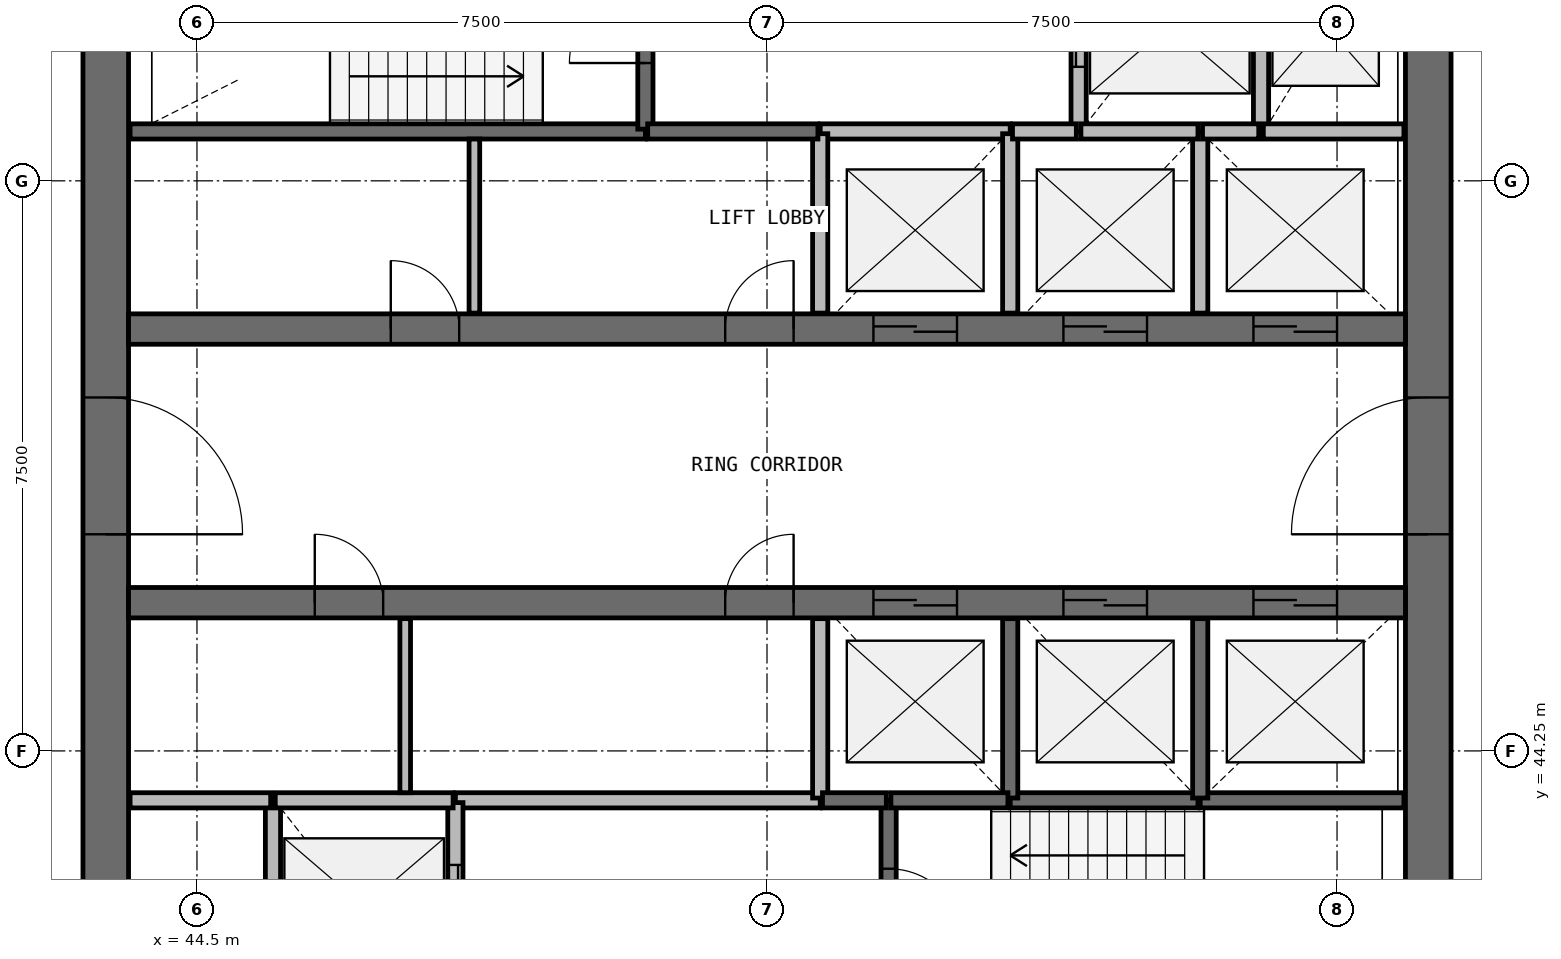
"""IFC4 building model, lengths in metres.
Left out: names, types, materials, properties, quantities, classifications, styles, units other than length and angle.
Written with IfcOpenShell. Run it as: python <this file> out.ifc"""

import sys

from ifc_helpers import new_model, si_unit, direction, frame, frame_2d, origin, place, context, subcontext, project, spatial, rectangle, extrude, source, transform, mapped, element, fill, save


model = new_model("IFC4")
c1 = context("Model", 3, precision=1e-05, world=origin(), true_north=direction((0.0, 1.0)))
c2 = subcontext(c1, "Body", "Model", "MODEL_VIEW")
j1 = project(units=[si_unit("LENGTHUNIT", "METRE"), si_unit("PLANEANGLEUNIT", "RADIAN")], contexts=[c1])
p1 = place(None, origin())
s1 = spatial("IfcSite", under=j1, at=p1, CompositionType="ELEMENT")
p2 = place(p1, origin())
s2 = spatial("IfcBuilding", under=s1, at=p2, CompositionType="ELEMENT")
p3 = place(p2, frame((0.0, 0.0, 211.1)))
s3 = spatial("IfcBuildingStorey", under=s2, at=p3, CompositionType="ELEMENT", Elevation=211.1)
p4 = place(p3, frame((60.7, 40.0, 0.0), z_axis=(0.0, 0.0, 1.0), x_axis=(0.0, 1.0, 0.0)))
e1 = element("IfcWall", 1, at=p4, inside=s3, PredefinedType="SHEAR", context=c2, shape_type="SweptSolid", body=[
    extrude(rectangle(XDim=16.0, YDim=0.6, at=frame_2d((8.0, 0.0))), origin(), (0.0, 0.0, 1.0), 3.9),
])
p5 = place(p4, frame((7.1, 0.0, 0.0)))
e2 = element("IfcOpeningElement", 2, at=p5, cuts=e1, PredefinedType="OPENING", context=c2, shape_type="SweptSolid", body=[
    extrude(rectangle(XDim=1.8, YDim=2.1, at=frame_2d((0.9, 1.05))), frame((0.0, 0.31, 0.0), z_axis=(0.0, -1.0, 0.0), x_axis=(1.0, 0.0, 0.0)), (0.0, 0.0, 1.0), 0.62),
])
p6 = place(p3, frame((43.3, 56.0, 0.0), z_axis=(0.0, 0.0, 1.0), x_axis=(0.0, -1.0, 0.0)))
e3 = element("IfcWall", 3, at=p6, inside=s3, PredefinedType="SHEAR", context=c2, shape_type="SweptSolid", body=[
    extrude(rectangle(XDim=16.0, YDim=0.6, at=frame_2d((8.0, 0.0))), origin(), (0.0, 0.0, 1.0), 3.9),
])
p7 = place(p6, frame((7.1, 0.0, 0.0)))
e4 = element("IfcOpeningElement", 4, at=p7, cuts=e3, PredefinedType="OPENING", context=c2, shape_type="SweptSolid", body=[
    extrude(rectangle(XDim=1.8, YDim=2.1, at=frame_2d((0.9, 1.05))), frame((0.0, 0.31, 0.0), z_axis=(0.0, -1.0, 0.0), x_axis=(1.0, 0.0, 0.0)), (0.0, 0.0, 1.0), 0.62),
])
p8 = place(p3, frame((43.6, 49.8, 0.0), z_axis=(0.0, 0.0, 1.0), x_axis=(1.0, 0.0, 0.0)))
e5 = element("IfcWall", 5, at=p8, inside=s3, PredefinedType="SHEAR", context=c2, shape_type="SweptSolid", body=[
    extrude(rectangle(XDim=16.8, YDim=0.4, at=frame_2d((8.4, 0.0))), origin(), (0.0, 0.0, 1.0), 3.9),
])
p9 = place(p8, frame((9.8, 0.0, 0.0)))
e6 = element("IfcOpeningElement", 6, at=p9, cuts=e5, PredefinedType="OPENING", context=c2, shape_type="SweptSolid", body=[
    extrude(rectangle(XDim=1.1, YDim=2.1, at=frame_2d((0.55, 1.05))), frame((0.0, 0.21, 0.0), z_axis=(0.0, -1.0, 0.0), x_axis=(1.0, 0.0, 0.0)), (0.0, 0.0, 1.0), 0.42),
])
p10 = place(p8, frame((12.3, 0.0, 0.0)))
e7 = element("IfcOpeningElement", 7, at=p10, cuts=e5, PredefinedType="OPENING", context=c2, shape_type="SweptSolid", body=[
    extrude(rectangle(XDim=1.1, YDim=2.1, at=frame_2d((0.55, 1.05))), frame((0.0, 0.21, 0.0), z_axis=(0.0, -1.0, 0.0), x_axis=(1.0, 0.0, 0.0)), (0.0, 0.0, 1.0), 0.42),
])
p11 = place(p8, frame((14.8, 0.0, 0.0)))
e8 = element("IfcOpeningElement", 8, at=p11, cuts=e5, PredefinedType="OPENING", context=c2, shape_type="SweptSolid", body=[
    extrude(rectangle(XDim=1.1, YDim=2.1, at=frame_2d((0.55, 1.05))), frame((0.0, 0.21, 0.0), z_axis=(0.0, -1.0, 0.0), x_axis=(1.0, 0.0, 0.0)), (0.0, 0.0, 1.0), 0.42),
])
p12 = place(p8, frame((3.45, 0.0, 0.0)))
e9 = element("IfcOpeningElement", 9, at=p12, cuts=e5, PredefinedType="OPENING", context=c2, shape_type="SweptSolid", body=[
    extrude(rectangle(XDim=0.9, YDim=2.1, at=frame_2d((0.45, 1.05))), frame((0.0, 0.21, 0.0), z_axis=(0.0, -1.0, 0.0), x_axis=(1.0, 0.0, 0.0)), (0.0, 0.0, 1.0), 0.42),
])
p13 = place(p8, frame((7.85, 0.0, 0.0)))
e10 = element("IfcOpeningElement", 10, at=p13, cuts=e5, PredefinedType="OPENING", context=c2, shape_type="SweptSolid", body=[
    extrude(rectangle(XDim=0.9, YDim=2.1, at=frame_2d((0.45, 1.05))), frame((0.0, 0.21, 0.0), z_axis=(0.0, -1.0, 0.0), x_axis=(1.0, 0.0, 0.0)), (0.0, 0.0, 1.0), 0.42),
])
p14 = place(p3, frame((43.6, 46.2, 0.0), z_axis=(0.0, 0.0, 1.0), x_axis=(1.0, 0.0, 0.0)))
e11 = element("IfcWall", 11, at=p14, inside=s3, PredefinedType="SHEAR", context=c2, shape_type="SweptSolid", body=[
    extrude(rectangle(XDim=16.8, YDim=0.4, at=frame_2d((8.4, 0.0))), origin(), (0.0, 0.0, 1.0), 3.9),
])
p15 = place(p14, frame((9.8, 0.0, 0.0)))
e12 = element("IfcOpeningElement", 12, at=p15, cuts=e11, PredefinedType="OPENING", context=c2, shape_type="SweptSolid", body=[
    extrude(rectangle(XDim=1.1, YDim=2.1, at=frame_2d((0.55, 1.05))), frame((0.0, 0.21, 0.0), z_axis=(0.0, -1.0, 0.0), x_axis=(1.0, 0.0, 0.0)), (0.0, 0.0, 1.0), 0.42),
])
p16 = place(p14, frame((12.3, 0.0, 0.0)))
e13 = element("IfcOpeningElement", 13, at=p16, cuts=e11, PredefinedType="OPENING", context=c2, shape_type="SweptSolid", body=[
    extrude(rectangle(XDim=1.1, YDim=2.1, at=frame_2d((0.55, 1.05))), frame((0.0, 0.21, 0.0), z_axis=(0.0, -1.0, 0.0), x_axis=(1.0, 0.0, 0.0)), (0.0, 0.0, 1.0), 0.42),
])
p17 = place(p14, frame((14.8, 0.0, 0.0)))
e14 = element("IfcOpeningElement", 14, at=p17, cuts=e11, PredefinedType="OPENING", context=c2, shape_type="SweptSolid", body=[
    extrude(rectangle(XDim=1.1, YDim=2.1, at=frame_2d((0.55, 1.05))), frame((0.0, 0.21, 0.0), z_axis=(0.0, -1.0, 0.0), x_axis=(1.0, 0.0, 0.0)), (0.0, 0.0, 1.0), 0.42),
])
p18 = place(p14, frame((2.45, 0.0, 0.0)))
e15 = element("IfcOpeningElement", 15, at=p18, cuts=e11, PredefinedType="OPENING", context=c2, shape_type="SweptSolid", body=[
    extrude(rectangle(XDim=0.9, YDim=2.1, at=frame_2d((0.45, 1.05))), frame((0.0, 0.21, 0.0), z_axis=(0.0, -1.0, 0.0), x_axis=(1.0, 0.0, 0.0)), (0.0, 0.0, 1.0), 0.42),
])
p19 = place(p14, frame((7.85, 0.0, 0.0)))
e16 = element("IfcOpeningElement", 16, at=p19, cuts=e11, PredefinedType="OPENING", context=c2, shape_type="SweptSolid", body=[
    extrude(rectangle(XDim=0.9, YDim=2.1, at=frame_2d((0.45, 1.05))), frame((0.0, 0.21, 0.0), z_axis=(0.0, -1.0, 0.0), x_axis=(1.0, 0.0, 0.0)), (0.0, 0.0, 1.0), 0.42),
])
p20 = place(p3, frame((43.62, 52.4, 0.0), z_axis=(0.0, 0.0, 1.0), x_axis=(1.0, 0.0, 0.0)))
e17 = element("IfcWall", 17, at=p20, inside=s3, PredefinedType="SOLIDWALL", context=c2, shape_type="SweptSolid", body=[
    extrude(rectangle(XDim=6.78, YDim=0.2, at=frame_2d((3.39, 0.0))), origin(), (0.0, 0.0, 1.0), 3.58),
])
p21 = place(p3, frame((52.7, 43.6, 0.0), z_axis=(0.0, 0.0, 1.0), x_axis=(-1.0, 0.0, 0.0)))
e18 = element("IfcWall", 18, at=p21, inside=s3, PredefinedType="SOLIDWALL", context=c2, shape_type="SweptSolid", body=[
    extrude(rectangle(XDim=4.8, YDim=0.2, at=frame_2d((2.4, 0.0))), origin(), (0.0, 0.0, 1.0), 3.58),
])
p22 = place(p3, frame((45.5, 43.6, 0.0), z_axis=(0.0, 0.0, 1.0), x_axis=(0.0, -1.0, 0.0)))
e19 = element("IfcWall", 19, at=p22, inside=s3, PredefinedType="SOLIDWALL", context=c2, shape_type="SweptSolid", body=[
    extrude(rectangle(XDim=2.98, YDim=0.2, at=frame_2d((1.49, 0.0))), origin(), (0.0, 0.0, 1.0), 3.58),
])
p23 = place(p3, frame((47.9, 40.62, 0.0), z_axis=(0.0, 0.0, 1.0), x_axis=(0.0, 1.0, 0.0)))
e20 = element("IfcWall", 20, at=p23, inside=s3, PredefinedType="SOLIDWALL", context=c2, shape_type="SweptSolid", body=[
    extrude(rectangle(XDim=2.95, YDim=0.2, at=frame_2d((1.475, 0.0))), origin(), (0.0, 0.0, 1.0), 3.58),
])
p24 = place(p23, frame((1.03, 0.0, 0.0)))
e21 = element("IfcOpeningElement", 21, at=p24, cuts=e20, PredefinedType="OPENING", context=c2, shape_type="SweptSolid", body=[
    extrude(rectangle(XDim=1.1, YDim=2.1, at=frame_2d((0.55, 1.05))), frame((0.0, 0.11, 0.0), z_axis=(0.0, -1.0, 0.0), x_axis=(1.0, 0.0, 0.0)), (0.0, 0.0, 1.0), 0.22),
])
p25 = place(p3, frame((50.4, 52.43, 0.0), z_axis=(0.0, 0.0, 1.0), x_axis=(0.0, 1.0, 0.0)))
e22 = element("IfcWall", 22, at=p25, inside=s3, PredefinedType="SOLIDWALL", context=c2, shape_type="SweptSolid", body=[
    extrude(rectangle(XDim=2.95, YDim=0.2, at=frame_2d((1.475, 0.0))), origin(), (0.0, 0.0, 1.0), 3.58),
])
p26 = place(p25, frame((0.87, 0.0, 0.0)))
e23 = element("IfcOpeningElement", 23, at=p26, cuts=e22, PredefinedType="OPENING", context=c2, shape_type="SweptSolid", body=[
    extrude(rectangle(XDim=1.0, YDim=2.1, at=frame_2d((0.5, 1.05))), frame((0.0, 0.11, 0.0), z_axis=(0.0, -1.0, 0.0), x_axis=(1.0, 0.0, 0.0)), (0.0, 0.0, 1.0), 0.22),
])
p27 = place(p3, frame((53.6, 43.6, 0.0), z_axis=(0.0, 0.0, 1.0), x_axis=(0.0, -1.0, 0.0)))
e24 = element("IfcWall", 24, at=p27, inside=s3, PredefinedType="SOLIDWALL", context=c2, shape_type="SweptSolid", body=[
    extrude(rectangle(XDim=2.98, YDim=0.2, at=frame_2d((1.49, 0.0))), origin(), (0.0, 0.0, 1.0), 3.58),
])
p28 = place(p27, frame((0.9, 0.0, 0.0)))
e25 = element("IfcOpeningElement", 25, at=p28, cuts=e24, PredefinedType="OPENING", context=c2, shape_type="SweptSolid", body=[
    extrude(rectangle(XDim=1.0, YDim=2.1, at=frame_2d((0.5, 1.05))), frame((0.0, 0.11, 0.0), z_axis=(0.0, -1.0, 0.0), x_axis=(1.0, 0.0, 0.0)), (0.0, 0.0, 1.0), 0.22),
])
p29 = place(p3, frame((56.1, 55.38, 0.0), z_axis=(0.0, 0.0, 1.0), x_axis=(0.0, -1.0, 0.0)))
e26 = element("IfcWall", 26, at=p29, inside=s3, PredefinedType="SOLIDWALL", context=c2, shape_type="SweptSolid", body=[
    extrude(rectangle(XDim=2.98, YDim=0.2, at=frame_2d((1.49, 0.0))), origin(), (0.0, 0.0, 1.0), 3.58),
])
p30 = place(p29, frame((1.03, 0.0, 0.0)))
e27 = element("IfcOpeningElement", 27, at=p30, cuts=e26, PredefinedType="OPENING", context=c2, shape_type="SweptSolid", body=[
    extrude(rectangle(XDim=1.1, YDim=2.1, at=frame_2d((0.55, 1.05))), frame((0.0, 0.11, 0.0), z_axis=(0.0, -1.0, 0.0), x_axis=(1.0, 0.0, 0.0)), (0.0, 0.0, 1.0), 0.22),
])
p31 = place(p3, frame((58.5, 52.4, 0.0), z_axis=(0.0, 0.0, 1.0), x_axis=(0.0, 1.0, 0.0)))
e28 = element("IfcWall", 28, at=p31, inside=s3, PredefinedType="SOLIDWALL", context=c2, shape_type="SweptSolid", body=[
    extrude(rectangle(XDim=2.98, YDim=0.2, at=frame_2d((1.49, 0.0))), origin(), (0.0, 0.0, 1.0), 3.58),
])
p32 = place(p3, frame((57.7, 43.6, 0.0), z_axis=(0.0, 0.0, 1.0), x_axis=(1.0, 0.0, 0.0)))
e29 = element("IfcWall", 29, at=p32, inside=s3, PredefinedType="SOLIDWALL", context=c2, shape_type="SweptSolid", body=[
    extrude(rectangle(XDim=2.68, YDim=0.2, at=frame_2d((1.34, 0.0))), origin(), (0.0, 0.0, 1.0), 3.58),
])
p33 = place(p3, frame((55.2, 52.4, 0.0), z_axis=(0.0, 0.0, 1.0), x_axis=(-1.0, 0.0, 0.0)))
e30 = element("IfcWall", 30, at=p33, inside=s3, PredefinedType="SOLIDWALL", context=c2, shape_type="SweptSolid", body=[
    extrude(rectangle(XDim=2.5, YDim=0.2, at=frame_2d((1.25, 0.0))), origin(), (0.0, 0.0, 1.0), 3.58),
])
p34 = place(p3, frame((55.2, 43.6, 0.0), z_axis=(0.0, 0.0, 1.0), x_axis=(1.0, 0.0, 0.0)))
e31 = element("IfcWall", 31, at=p34, inside=s3, PredefinedType="SOLIDWALL", context=c2, shape_type="SweptSolid", body=[
    extrude(rectangle(XDim=2.47, YDim=0.2, at=frame_2d((1.235, 0.0))), origin(), (0.0, 0.0, 1.0), 3.58),
])
p35 = place(p3, frame((47.87, 43.6, 0.0), z_axis=(0.0, 0.0, 1.0), x_axis=(-1.0, 0.0, 0.0)))
e32 = element("IfcWall", 32, at=p35, inside=s3, PredefinedType="SOLIDWALL", context=c2, shape_type="SweptSolid", body=[
    extrude(rectangle(XDim=2.34, YDim=0.2, at=frame_2d((1.17, 0.0))), origin(), (0.0, 0.0, 1.0), 3.58),
])
for number, where, z_axis, x_axis in (
    (33, (52.7, 45.99, 0.0), (0.0, 0.0, 1.0), (0.0, -1.0, 0.0)),
    (34, (52.7, 52.37, 0.0), (0.0, 0.0, 1.0), (0.0, -1.0, 0.0)),
    (35, (55.2, 43.63, 0.0), (0.0, 0.0, 1.0), (0.0, 1.0, 0.0)),
    (36, (55.2, 50.01, 0.0), (0.0, 0.0, 1.0), (0.0, 1.0, 0.0)),
    (37, (57.7, 43.63, 0.0), (0.0, 0.0, 1.0), (0.0, 1.0, 0.0)),
):
    element("IfcWall", number, at=place(p3, frame(where, z_axis=z_axis, x_axis=x_axis)), inside=s3, PredefinedType="SOLIDWALL", context=c2, shape_type="SweptSolid", body=[
        extrude(rectangle(XDim=2.36, YDim=0.2, at=frame_2d((1.18, 0.0))), origin(), (0.0, 0.0, 1.0), 3.58),
    ])
p36 = place(p3, frame((57.7, 50.01, 0.0), z_axis=(0.0, 0.0, 1.0), x_axis=(0.0, 1.0, 0.0)))
e38 = element("IfcWall", 38, at=p36, inside=s3, PredefinedType="SOLIDWALL", context=c2, shape_type="SweptSolid", body=[
    extrude(rectangle(XDim=2.39, YDim=0.2, at=frame_2d((1.195, 0.0))), origin(), (0.0, 0.0, 1.0), 3.58),
])
p37 = place(p3, frame((50.43, 52.4, 0.0), z_axis=(0.0, 0.0, 1.0), x_axis=(1.0, 0.0, 0.0)))
e39 = element("IfcWall", 39, at=p37, inside=s3, PredefinedType="SOLIDWALL", context=c2, shape_type="SweptSolid", body=[
    extrude(rectangle(XDim=2.24, YDim=0.2, at=frame_2d((1.12, 0.0))), origin(), (0.0, 0.0, 1.0), 3.58),
])
for number, where, z_axis, x_axis in (
    (40, (45.47, 43.6, 0.0), (0.0, 0.0, 1.0), (-1.0, 0.0, 0.0)),
    (41, (60.38, 52.4, 0.0), (0.0, 0.0, 1.0), (-1.0, 0.0, 0.0)),
):
    element("IfcWall", number, at=place(p3, frame(where, z_axis=z_axis, x_axis=x_axis)), inside=s3, PredefinedType="SOLIDWALL", context=c2, shape_type="SweptSolid", body=[
        extrude(rectangle(XDim=1.85, YDim=0.2, at=frame_2d((0.925, 0.0))), origin(), (0.0, 0.0, 1.0), 3.58),
    ])
for number, where, z_axis, x_axis in (
    (42, (53.63, 43.6, 0.0), (0.0, 0.0, 1.0), (1.0, 0.0, 0.0)),
    (43, (57.67, 52.4, 0.0), (0.0, 0.0, 1.0), (-1.0, 0.0, 0.0)),
):
    element("IfcWall", number, at=place(p3, frame(where, z_axis=z_axis, x_axis=x_axis)), inside=s3, PredefinedType="SOLIDWALL", context=c2, shape_type="SweptSolid", body=[
        extrude(rectangle(XDim=1.54, YDim=0.2, at=frame_2d((0.77, 0.0))), origin(), (0.0, 0.0, 1.0), 3.58),
    ])
for number, where, z_axis, x_axis in (
    (44, (52.73, 43.6, 0.0), (0.0, 0.0, 1.0), (1.0, 0.0, 0.0)),
    (45, (56.07, 52.4, 0.0), (0.0, 0.0, 1.0), (-1.0, 0.0, 0.0)),
):
    element("IfcWall", number, at=place(p3, frame(where, z_axis=z_axis, x_axis=x_axis)), inside=s3, PredefinedType="SOLIDWALL", context=c2, shape_type="SweptSolid", body=[
        extrude(rectangle(XDim=0.84, YDim=0.2, at=frame_2d((0.42, 0.0))), origin(), (0.0, 0.0, 1.0), 3.58),
    ])
p38 = place(p3, frame((58.47, 52.4, 0.0), z_axis=(0.0, 0.0, 1.0), x_axis=(-1.0, 0.0, 0.0)))
e46 = element("IfcWall", 46, at=p38, inside=s3, PredefinedType="SOLIDWALL", context=c2, shape_type="SweptSolid", body=[
    extrude(rectangle(XDim=0.74, YDim=0.2, at=frame_2d((0.37, 0.0))), origin(), (0.0, 0.0, 1.0), 3.58),
])
for number, where, z_axis, x_axis in (
    (47, (47.24, 43.7, 0.0), (0.0, 0.0, 1.0), (0.0, 1.0, 0.0)),
    (48, (48.15, 50.01, 0.0), (0.0, 0.0, 1.0), (0.0, 1.0, 0.0)),
):
    element("IfcWall", number, at=place(p3, frame(where, z_axis=z_axis, x_axis=x_axis)), inside=s3, PredefinedType="PARTITIONING", context=c2, shape_type="SweptSolid", body=[
        extrude(rectangle(XDim=2.29, YDim=0.14, at=frame_2d((1.145, 0.0))), origin(), (0.0, 0.0, 1.0), 2.88),
    ])
m1 = source(origin(), c2, "Body", "SweptSolid", [
    extrude(rectangle(XDim=1.8, YDim=2.1, at=frame_2d((0.9, 1.05))), frame((0.0, 0.025, 0.0), z_axis=(0.0, -1.0, 0.0), x_axis=(1.0, 0.0, 0.0)), (0.0, 0.0, 1.0), 0.05),
])
p39 = place(p7, origin())
e49 = element("IfcDoor", 49, at=p39, inside=s3, OperationType="SINGLE_SWING_RIGHT", PredefinedType="DOOR", context=c2, shape_type="MappedRepresentation", body=[
    mapped(m1, transform((0.0, 0.0, 0.0), scale=1.0)),
])
fill(e4, e49)
p40 = place(p5, origin())
e50 = element("IfcDoor", 50, at=p40, inside=s3, OperationType="SINGLE_SWING_LEFT", PredefinedType="DOOR", context=c2, shape_type="MappedRepresentation", body=[
    mapped(m1, transform((0.0, 0.0, 0.0), scale=1.0)),
])
fill(e2, e50)
m2 = source(origin(), c2, "Body", "SweptSolid", [
    extrude(rectangle(XDim=1.1, YDim=2.1, at=frame_2d((0.55, 1.05))), frame((0.0, 0.025, 0.0), z_axis=(0.0, -1.0, 0.0), x_axis=(1.0, 0.0, 0.0)), (0.0, 0.0, 1.0), 0.05),
])
p41 = place(p9, origin())
e51 = element("IfcDoor", 51, at=p41, inside=s3, OperationType="DOUBLE_DOOR_SLIDING", PredefinedType="USERDEFINED", context=c2, shape_type="MappedRepresentation", body=[
    mapped(m2, transform((0.0, 0.0, 0.0), scale=1.0)),
])
fill(e6, e51)
p42 = place(p10, origin())
e52 = element("IfcDoor", 52, at=p42, inside=s3, OperationType="DOUBLE_DOOR_SLIDING", PredefinedType="USERDEFINED", context=c2, shape_type="MappedRepresentation", body=[
    mapped(m2, transform((0.0, 0.0, 0.0), scale=1.0)),
])
fill(e7, e52)
p43 = place(p11, origin())
e53 = element("IfcDoor", 53, at=p43, inside=s3, OperationType="DOUBLE_DOOR_SLIDING", PredefinedType="USERDEFINED", context=c2, shape_type="MappedRepresentation", body=[
    mapped(m2, transform((0.0, 0.0, 0.0), scale=1.0)),
])
fill(e8, e53)
p44 = place(p15, origin())
e54 = element("IfcDoor", 54, at=p44, inside=s3, OperationType="DOUBLE_DOOR_SLIDING", PredefinedType="USERDEFINED", context=c2, shape_type="MappedRepresentation", body=[
    mapped(m2, transform((0.0, 0.0, 0.0), scale=1.0)),
])
fill(e12, e54)
p45 = place(p16, origin())
e55 = element("IfcDoor", 55, at=p45, inside=s3, OperationType="DOUBLE_DOOR_SLIDING", PredefinedType="USERDEFINED", context=c2, shape_type="MappedRepresentation", body=[
    mapped(m2, transform((0.0, 0.0, 0.0), scale=1.0)),
])
fill(e13, e55)
p46 = place(p17, origin())
e56 = element("IfcDoor", 56, at=p46, inside=s3, OperationType="DOUBLE_DOOR_SLIDING", PredefinedType="USERDEFINED", context=c2, shape_type="MappedRepresentation", body=[
    mapped(m2, transform((0.0, 0.0, 0.0), scale=1.0)),
])
fill(e14, e56)
p47 = place(p30, origin())
e57 = element("IfcDoor", 57, at=p47, inside=s3, OperationType="DOUBLE_DOOR_SLIDING", PredefinedType="USERDEFINED", context=c2, shape_type="MappedRepresentation", body=[
    mapped(m2, transform((0.0, 0.0, 0.0), scale=1.0)),
])
fill(e27, e57)
p48 = place(p24, origin())
e58 = element("IfcDoor", 58, at=p48, inside=s3, OperationType="DOUBLE_DOOR_SLIDING", PredefinedType="USERDEFINED", context=c2, shape_type="MappedRepresentation", body=[
    mapped(m2, transform((0.0, 0.0, 0.0), scale=1.0)),
])
fill(e21, e58)
m3 = source(origin(), c2, "Body", "SweptSolid", [
    extrude(rectangle(XDim=1.0, YDim=2.1, at=frame_2d((0.5, 1.05))), frame((0.0, 0.025, 0.0), z_axis=(0.0, -1.0, 0.0), x_axis=(1.0, 0.0, 0.0)), (0.0, 0.0, 1.0), 0.05),
])
p49 = place(p26, origin())
e59 = element("IfcDoor", 59, at=p49, inside=s3, OperationType="SINGLE_SWING_LEFT", PredefinedType="DOOR", context=c2, shape_type="MappedRepresentation", body=[
    mapped(m3, transform((0.0, 0.0, 0.0), scale=1.0)),
])
fill(e23, e59)
p50 = place(p28, origin())
e60 = element("IfcDoor", 60, at=p50, inside=s3, OperationType="SINGLE_SWING_RIGHT", PredefinedType="DOOR", context=c2, shape_type="MappedRepresentation", body=[
    mapped(m3, transform((0.0, 0.0, 0.0), scale=1.0)),
])
fill(e25, e60)
m4 = source(origin(), c2, "Body", "SweptSolid", [
    extrude(rectangle(XDim=0.9, YDim=2.1, at=frame_2d((0.45, 1.05))), frame((0.0, 0.025, 0.0), z_axis=(0.0, -1.0, 0.0), x_axis=(1.0, 0.0, 0.0)), (0.0, 0.0, 1.0), 0.05),
])
p51 = place(p12, origin())
e61 = element("IfcDoor", 61, at=p51, inside=s3, OperationType="SINGLE_SWING_LEFT", PredefinedType="DOOR", context=c2, shape_type="MappedRepresentation", body=[
    mapped(m4, transform((0.0, 0.0, 0.0), scale=1.0)),
])
fill(e9, e61)
p52 = place(p13, origin())
e62 = element("IfcDoor", 62, at=p52, inside=s3, OperationType="SINGLE_SWING_RIGHT", PredefinedType="DOOR", context=c2, shape_type="MappedRepresentation", body=[
    mapped(m4, transform((0.0, 0.0, 0.0), scale=1.0)),
])
fill(e10, e62)
p53 = place(p18, origin())
e63 = element("IfcDoor", 63, at=p53, inside=s3, OperationType="SINGLE_SWING_LEFT", PredefinedType="DOOR", context=c2, shape_type="MappedRepresentation", body=[
    mapped(m4, transform((0.0, 0.0, 0.0), scale=1.0)),
])
fill(e15, e63)
p54 = place(p19, origin())
e64 = element("IfcDoor", 64, at=p54, inside=s3, OperationType="SINGLE_SWING_RIGHT", PredefinedType="DOOR", context=c2, shape_type="MappedRepresentation", body=[
    mapped(m4, transform((0.0, 0.0, 0.0), scale=1.0)),
])
fill(e16, e64)
save(model, sys.argv[1])
